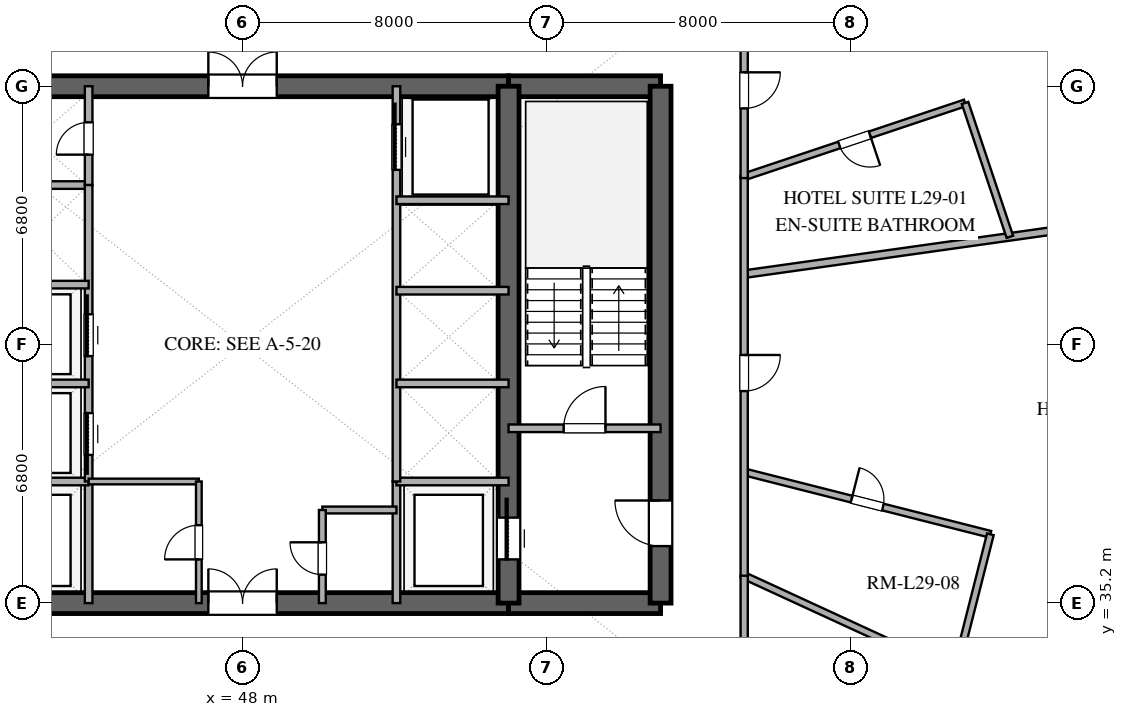
"""IFC4 building model, lengths in metres.
Left out: names, types, materials, properties, quantities, classifications, styles, units other than length and angle.
Written with IfcOpenShell. Run it as: python <this file> out.ifc"""

import sys

from ifc_helpers import new_model, si_unit, direction, frame, frame_2d, origin, place, context, subcontext, project, spatial, rectangle, extrude, element, fill, save


model = new_model("IFC4")
c1 = context("Model", 3, precision=1e-05, world=origin(), true_north=direction((0.0, 1.0)))
c2 = subcontext(c1, "Body", "Model", "MODEL_VIEW")
j1 = project(units=[si_unit("LENGTHUNIT", "METRE"), si_unit("PLANEANGLEUNIT", "RADIAN")], contexts=[c1])
p1 = place(None, origin())
s1 = spatial("IfcSite", under=j1, at=p1, CompositionType="ELEMENT")
p2 = place(p1, origin())
s2 = spatial("IfcBuilding", under=s1, at=p2, CompositionType="ELEMENT")
p3 = place(p2, frame((0.0, 0.0, 116.4)))
s3 = spatial("IfcBuildingStorey", under=s2, at=p3, CompositionType="ELEMENT", Elevation=116.4)
p4 = place(p3, frame((41.0, 35.2, 0.0), z_axis=(0.0, 0.0, 1.0), x_axis=(1.0, 0.0, 0.0)))
e1 = element("IfcWall", 1, at=p4, inside=s3, PredefinedType="SHEAR", context=c2, shape_type="SweptSolid", body=[
    extrude(rectangle(XDim=14.0, YDim=0.55, at=frame_2d((7.0, 0.0))), origin(), (0.0, 0.0, 1.0), 3.38),
])
p5 = place(p4, frame((6.1, 0.0, 0.0)))
e2 = element("IfcOpeningElement", 2, at=p5, cuts=e1, PredefinedType="OPENING", context=c2, shape_type="SweptSolid", body=[
    extrude(rectangle(XDim=1.8, YDim=2.25, at=frame_2d((0.9, 1.125))), frame((0.0, 0.285, 0.0), z_axis=(0.0, -1.0, 0.0), x_axis=(1.0, 0.0, 0.0)), (0.0, 0.0, 1.0), 0.57),
])
p6 = place(p3, frame((55.0, 35.2, 0.0), z_axis=(0.0, 0.0, 1.0), x_axis=(1.0, 0.0, 0.0)))
e3 = element("IfcWall", 3, at=p6, inside=s3, PredefinedType="SHEAR", context=c2, shape_type="SweptSolid", body=[
    extrude(rectangle(XDim=4.0, YDim=0.55, at=frame_2d((2.0, 0.0))), origin(), (0.0, 0.0, 1.0), 3.38),
])
p7 = place(p3, frame((41.0, 48.8, 0.0), z_axis=(0.0, 0.0, 1.0), x_axis=(1.0, 0.0, 0.0)))
e4 = element("IfcWall", 4, at=p7, inside=s3, PredefinedType="SHEAR", context=c2, shape_type="SweptSolid", body=[
    extrude(rectangle(XDim=14.0, YDim=0.55, at=frame_2d((7.0, 0.0))), origin(), (0.0, 0.0, 1.0), 3.38),
])
p8 = place(p7, frame((6.1, 0.0, 0.0)))
e5 = element("IfcOpeningElement", 5, at=p8, cuts=e4, PredefinedType="OPENING", context=c2, shape_type="SweptSolid", body=[
    extrude(rectangle(XDim=1.8, YDim=2.25, at=frame_2d((0.9, 1.125))), frame((0.0, 0.285, 0.0), z_axis=(0.0, -1.0, 0.0), x_axis=(1.0, 0.0, 0.0)), (0.0, 0.0, 1.0), 0.57),
])
p9 = place(p3, frame((55.0, 48.8, 0.0), z_axis=(0.0, 0.0, 1.0), x_axis=(1.0, 0.0, 0.0)))
e6 = element("IfcWall", 6, at=p9, inside=s3, PredefinedType="SHEAR", context=c2, shape_type="SweptSolid", body=[
    extrude(rectangle(XDim=4.0, YDim=0.55, at=frame_2d((2.0, 0.0))), origin(), (0.0, 0.0, 1.0), 3.38),
])
p10 = place(p3, frame((59.0, 35.2, 0.0), z_axis=(0.0, 0.0, 1.0), x_axis=(0.0, 1.0, 0.0)))
e7 = element("IfcWall", 7, at=p10, inside=s3, PredefinedType="SHEAR", context=c2, shape_type="SweptSolid", body=[
    extrude(rectangle(XDim=13.6, YDim=0.55, at=frame_2d((6.8, 0.0))), origin(), (0.0, 0.0, 1.0), 3.38),
])
p11 = place(p10, frame((1.5, 0.0, 0.0)))
e8 = element("IfcOpeningElement", 8, at=p11, cuts=e7, PredefinedType="OPENING", context=c2, shape_type="SweptSolid", body=[
    extrude(rectangle(XDim=1.2, YDim=2.15, at=frame_2d((0.6, 1.075))), frame((0.0, 0.285, 0.0), z_axis=(0.0, -1.0, 0.0), x_axis=(1.0, 0.0, 0.0)), (0.0, 0.0, 1.0), 0.57),
])
p12 = place(p3, frame((55.0, 35.2, 0.0), z_axis=(0.0, 0.0, 1.0), x_axis=(0.0, 1.0, 0.0)))
e9 = element("IfcWall", 9, at=p12, inside=s3, PredefinedType="SHEAR", context=c2, shape_type="SweptSolid", body=[
    extrude(rectangle(XDim=13.6, YDim=0.55, at=frame_2d((6.8, 0.0))), origin(), (0.0, 0.0, 1.0), 3.38),
])
p13 = place(p12, frame((1.15, 0.0, 0.0)))
e10 = element("IfcOpeningElement", 10, at=p13, cuts=e9, PredefinedType="OPENING", context=c2, shape_type="SweptSolid", body=[
    extrude(rectangle(XDim=1.1, YDim=2.2, at=frame_2d((0.55, 1.1))), frame((0.0, 0.285, 0.0), z_axis=(0.0, -1.0, 0.0), x_axis=(1.0, 0.0, 0.0)), (0.0, 0.0, 1.0), 0.57),
])
p14 = place(p3, frame((55.0, 39.8, 0.0), z_axis=(0.0, 0.0, 1.0), x_axis=(1.0, 0.0, 0.0)))
e11 = element("IfcWall", 11, at=p14, inside=s3, PredefinedType="SOLIDWALL", context=c2, shape_type="SweptSolid", body=[
    extrude(rectangle(XDim=4.0, YDim=0.2, at=frame_2d((2.0, 0.0))), origin(), (0.0, 0.0, 1.0), 2.74),
])
p15 = place(p14, frame((1.45, 0.0, 0.0)))
e12 = element("IfcOpeningElement", 12, at=p15, cuts=e11, PredefinedType="OPENING", context=c2, shape_type="SweptSolid", body=[
    extrude(rectangle(XDim=1.1, YDim=2.15, at=frame_2d((0.55, 1.075))), frame((0.0, 0.11, 0.0), z_axis=(0.0, -1.0, 0.0), x_axis=(1.0, 0.0, 0.0)), (0.0, 0.0, 1.0), 0.22),
])
p16 = place(p3, frame((43.95, 35.2, 0.0), z_axis=(0.0, 0.0, 1.0), x_axis=(0.0, 1.0, 0.0)))
e13 = element("IfcWall", 13, at=p16, inside=s3, PredefinedType="SOLIDWALL", context=c2, shape_type="SweptSolid", body=[
    extrude(rectangle(XDim=3.2, YDim=0.2, at=frame_2d((1.6, 0.0))), origin(), (0.0, 0.0, 1.0), 2.74),
])
p17 = place(p3, frame((41.0, 38.4, 0.0), z_axis=(0.0, 0.0, 1.0), x_axis=(1.0, 0.0, 0.0)))
e14 = element("IfcWall", 14, at=p17, inside=s3, PredefinedType="SOLIDWALL", context=c2, shape_type="SweptSolid", body=[
    extrude(rectangle(XDim=2.95, YDim=0.2, at=frame_2d((1.475, 0.0))), origin(), (0.0, 0.0, 1.0), 2.74),
])
p18 = place(p3, frame((52.05, 35.2, 0.0), z_axis=(0.0, 0.0, 1.0), x_axis=(0.0, 1.0, 0.0)))
e15 = element("IfcWall", 15, at=p18, inside=s3, PredefinedType="SOLIDWALL", context=c2, shape_type="SweptSolid", body=[
    extrude(rectangle(XDim=3.2, YDim=0.2, at=frame_2d((1.6, 0.0))), origin(), (0.0, 0.0, 1.0), 2.74),
])
for number, where, z_axis, x_axis in (
    (16, (52.05, 38.4, 0.0), (0.0, 0.0, 1.0), (1.0, 0.0, 0.0)),
    (17, (41.0, 46.2, 0.0), (0.0, 0.0, 1.0), (1.0, 0.0, 0.0)),
):
    element("IfcWall", number, at=place(p3, frame(where, z_axis=z_axis, x_axis=x_axis)), inside=s3, PredefinedType="SOLIDWALL", context=c2, shape_type="SweptSolid", body=[
        extrude(rectangle(XDim=2.95, YDim=0.2, at=frame_2d((1.475, 0.0))), origin(), (0.0, 0.0, 1.0), 2.74),
    ])
p19 = place(p3, frame((43.95, 46.2, 0.0), z_axis=(0.0, 0.0, 1.0), x_axis=(0.0, 1.0, 0.0)))
e18 = element("IfcWall", 18, at=p19, inside=s3, PredefinedType="SOLIDWALL", context=c2, shape_type="SweptSolid", body=[
    extrude(rectangle(XDim=2.6, YDim=0.2, at=frame_2d((1.3, 0.0))), origin(), (0.0, 0.0, 1.0), 2.74),
])
p20 = place(p19, frame((0.8, 0.0, 0.0)))
e19 = element("IfcOpeningElement", 19, at=p20, cuts=e18, PredefinedType="OPENING", context=c2, shape_type="SweptSolid", body=[
    extrude(rectangle(XDim=0.85, YDim=2.15, at=frame_2d((0.425, 1.075))), frame((0.0, 0.11, 0.0), z_axis=(0.0, -1.0, 0.0), x_axis=(1.0, 0.0, 0.0)), (0.0, 0.0, 1.0), 0.22),
])
p21 = place(p3, frame((43.95, 38.4, 0.0), z_axis=(0.0, 0.0, 1.0), x_axis=(0.0, 1.0, 0.0)))
e20 = element("IfcWall", 20, at=p21, inside=s3, PredefinedType="SOLIDWALL", context=c2, shape_type="SweptSolid", body=[
    extrude(rectangle(XDim=7.8, YDim=0.2, at=frame_2d((3.9, 0.0))), origin(), (0.0, 0.0, 1.0), 2.74),
])
p22 = place(p21, frame((0.7, 0.0, 0.0)))
e21 = element("IfcOpeningElement", 21, at=p22, cuts=e20, PredefinedType="OPENING", context=c2, shape_type="SweptSolid", body=[
    extrude(rectangle(XDim=1.1, YDim=2.2, at=frame_2d((0.55, 1.1))), frame((0.0, 0.11, 0.0), z_axis=(0.0, -1.0, 0.0), x_axis=(1.0, 0.0, 0.0)), (0.0, 0.0, 1.0), 0.22),
])
p23 = place(p21, frame((3.3, 0.0, 0.0)))
e22 = element("IfcOpeningElement", 22, at=p23, cuts=e20, PredefinedType="OPENING", context=c2, shape_type="SweptSolid", body=[
    extrude(rectangle(XDim=1.1, YDim=2.2, at=frame_2d((0.55, 1.1))), frame((0.0, 0.11, 0.0), z_axis=(0.0, -1.0, 0.0), x_axis=(1.0, 0.0, 0.0)), (0.0, 0.0, 1.0), 0.22),
])
for number, where, z_axis, x_axis in (
    (23, (41.0, 40.98, 0.0), (0.0, 0.0, 1.0), (1.0, 0.0, 0.0)),
    (24, (41.0, 43.58, 0.0), (0.0, 0.0, 1.0), (1.0, 0.0, 0.0)),
):
    element("IfcWall", number, at=place(p3, frame(where, z_axis=z_axis, x_axis=x_axis)), inside=s3, PredefinedType="SOLIDWALL", context=c2, shape_type="SweptSolid", body=[
        extrude(rectangle(XDim=2.95, YDim=0.2, at=frame_2d((1.475, 0.0))), origin(), (0.0, 0.0, 1.0), 2.74),
    ])
p24 = place(p3, frame((52.05, 38.4, 0.0), z_axis=(0.0, 0.0, 1.0), x_axis=(0.0, 1.0, 0.0)))
e25 = element("IfcWall", 25, at=p24, inside=s3, PredefinedType="SOLIDWALL", context=c2, shape_type="SweptSolid", body=[
    extrude(rectangle(XDim=10.4, YDim=0.2, at=frame_2d((5.2, 0.0))), origin(), (0.0, 0.0, 1.0), 2.74),
])
p25 = place(p24, frame((8.2, 0.0, 0.0)))
e26 = element("IfcOpeningElement", 26, at=p25, cuts=e25, PredefinedType="OPENING", context=c2, shape_type="SweptSolid", body=[
    extrude(rectangle(XDim=1.2, YDim=2.2, at=frame_2d((0.6, 1.1))), frame((0.0, 0.11, 0.0), z_axis=(0.0, -1.0, 0.0), x_axis=(1.0, 0.0, 0.0)), (0.0, 0.0, 1.0), 0.22),
])
for number, where, z_axis, x_axis in (
    (27, (52.05, 40.98, 0.0), (0.0, 0.0, 1.0), (1.0, 0.0, 0.0)),
    (28, (52.05, 43.42, 0.0), (0.0, 0.0, 1.0), (1.0, 0.0, 0.0)),
    (29, (52.05, 45.8, 0.0), (0.0, 0.0, 1.0), (1.0, 0.0, 0.0)),
):
    element("IfcWall", number, at=place(p3, frame(where, z_axis=z_axis, x_axis=x_axis)), inside=s3, PredefinedType="SOLIDWALL", context=c2, shape_type="SweptSolid", body=[
        extrude(rectangle(XDim=2.95, YDim=0.2, at=frame_2d((1.475, 0.0))), origin(), (0.0, 0.0, 1.0), 2.74),
    ])
p26 = place(p3, frame((43.95, 38.4, 0.0), z_axis=(0.0, 0.0, 1.0), x_axis=(1.0, 0.0, 0.0)))
e30 = element("IfcWall", 30, at=p26, inside=s3, PredefinedType="PARTITIONING", context=c2, shape_type="SweptSolid", body=[
    extrude(rectangle(XDim=2.9, YDim=0.15, at=frame_2d((1.45, 0.0))), origin(), (0.0, 0.0, 1.0), 2.74),
])
p27 = place(p3, frame((46.85, 35.2, 0.0), z_axis=(0.0, 0.0, 1.0), x_axis=(0.0, 1.0, 0.0)))
e31 = element("IfcWall", 31, at=p27, inside=s3, PredefinedType="PARTITIONING", context=c2, shape_type="SweptSolid", body=[
    extrude(rectangle(XDim=3.2, YDim=0.15, at=frame_2d((1.6, 0.0))), origin(), (0.0, 0.0, 1.0), 2.74),
])
p28 = place(p27, frame((1.15, 0.0, 0.0)))
e32 = element("IfcOpeningElement", 32, at=p28, cuts=e31, PredefinedType="OPENING", context=c2, shape_type="SweptSolid", body=[
    extrude(rectangle(XDim=0.9, YDim=2.15, at=frame_2d((0.45, 1.075))), frame((0.0, 0.085, 0.0), z_axis=(0.0, -1.0, 0.0), x_axis=(1.0, 0.0, 0.0)), (0.0, 0.0, 1.0), 0.17),
])
p29 = place(p3, frame((50.1, 37.65, 0.0), z_axis=(0.0, 0.0, 1.0), x_axis=(1.0, 0.0, 0.0)))
e33 = element("IfcWall", 33, at=p29, inside=s3, PredefinedType="PLUMBINGWALL", context=c2, shape_type="SweptSolid", body=[
    extrude(rectangle(XDim=1.95, YDim=0.18, at=frame_2d((0.975, 0.0))), origin(), (0.0, 0.0, 1.0), 2.74),
])
p30 = place(p3, frame((50.1, 35.2, 0.0), z_axis=(0.0, 0.0, 1.0), x_axis=(0.0, 1.0, 0.0)))
e34 = element("IfcWall", 34, at=p30, inside=s3, PredefinedType="PLUMBINGWALL", context=c2, shape_type="SweptSolid", body=[
    extrude(rectangle(XDim=2.45, YDim=0.18, at=frame_2d((1.225, 0.0))), origin(), (0.0, 0.0, 1.0), 2.74),
])
p31 = place(p30, frame((0.75, 0.0, 0.0)))
e35 = element("IfcOpeningElement", 35, at=p31, cuts=e34, PredefinedType="OPENING", context=c2, shape_type="SweptSolid", body=[
    extrude(rectangle(XDim=0.85, YDim=2.1, at=frame_2d((0.425, 1.05))), frame((0.0, 0.1, 0.0), z_axis=(0.0, -1.0, 0.0), x_axis=(1.0, 0.0, 0.0)), (0.0, 0.0, 1.0), 0.2),
])
p32 = place(p3, frame((61.2, 43.855, 0.0), z_axis=(0.0, 0.0, 1.0), x_axis=(0.990266848234, 0.139181785048, 0.0)))
e36 = element("IfcWall", 36, at=p32, inside=s3, PredefinedType="PARTITIONING", context=c2, shape_type="SweptSolid", body=[
    extrude(rectangle(XDim=15.005, YDim=0.2, at=frame_2d((7.502, 0.0))), origin(), (0.0, 0.0, 1.0), 2.74),
])
p33 = place(p3, frame((61.2, 38.653, 0.0), z_axis=(0.0, 0.0, 1.0), x_axis=(0.96932048276, -0.24580032893, 0.0)))
e37 = element("IfcWall", 37, at=p33, inside=s3, PredefinedType="PLUMBINGWALL", context=c2, shape_type="SweptSolid", body=[
    extrude(rectangle(XDim=6.684, YDim=0.18, at=frame_2d((3.342, 0.0))), origin(), (0.0, 0.0, 1.0), 2.74),
])
p34 = place(p33, frame((2.917, 0.0, 0.0)))
e38 = element("IfcOpeningElement", 38, at=p34, cuts=e37, PredefinedType="OPENING", context=c2, shape_type="SweptSolid", body=[
    extrude(rectangle(XDim=0.85, YDim=2.1, at=frame_2d((0.425, 1.05))), frame((0.0, 0.1, 0.0), z_axis=(0.0, -1.0, 0.0), x_axis=(1.0, 0.0, 0.0)), (0.0, 0.0, 1.0), 0.2),
])
p35 = place(p3, frame((67.012, 48.361, 0.0), z_axis=(0.0, 0.0, 1.0), x_axis=(-0.948332174456, -0.317279193915, 0.0)))
e39 = element("IfcWall", 39, at=p35, inside=s3, PredefinedType="PLUMBINGWALL", context=c2, shape_type="SweptSolid", body=[
    extrude(rectangle(XDim=6.129, YDim=0.18, at=frame_2d((3.064, 0.0))), origin(), (0.0, 0.0, 1.0), 2.74),
])
p36 = place(p35, frame((2.639, 0.0, 0.0)))
e40 = element("IfcOpeningElement", 40, at=p36, cuts=e39, PredefinedType="OPENING", context=c2, shape_type="SweptSolid", body=[
    extrude(rectangle(XDim=0.85, YDim=2.1, at=frame_2d((0.425, 1.05))), frame((0.0, 0.1, 0.0), z_axis=(0.0, -1.0, 0.0), x_axis=(1.0, 0.0, 0.0)), (0.0, 0.0, 1.0), 0.2),
])
p37 = place(p3, frame((66.754, 33.363, 0.0), z_axis=(0.0, 0.0, 1.0), x_axis=(-0.908301480607, 0.418316172681, 0.0)))
e41 = element("IfcWall", 41, at=p37, inside=s3, PredefinedType="PLUMBINGWALL", context=c2, shape_type="SweptSolid", body=[
    extrude(rectangle(XDim=6.115, YDim=0.18, at=frame_2d((3.057, 0.0))), origin(), (0.0, 0.0, 1.0), 2.74),
])
p38 = place(p3, frame((61.2, 46.45, 0.0), z_axis=(0.0, 0.0, 1.0), x_axis=(0.0, -1.0, 0.0)))
e42 = element("IfcWall", 42, at=p38, inside=s3, PredefinedType="PARTITIONING", context=c2, shape_type="SweptSolid", body=[
    extrude(rectangle(XDim=10.564, YDim=0.19, at=frame_2d((5.282, 0.0))), origin(), (0.0, 0.0, 1.0), 2.74),
])
p39 = place(p38, frame((4.722, 0.0, 0.0)))
e43 = element("IfcOpeningElement", 43, at=p39, cuts=e42, PredefinedType="OPENING", context=c2, shape_type="SweptSolid", body=[
    extrude(rectangle(XDim=0.95, YDim=2.15, at=frame_2d((0.475, 1.075))), frame((0.0, 0.105, 0.0), z_axis=(0.0, -1.0, 0.0), x_axis=(1.0, 0.0, 0.0)), (0.0, 0.0, 1.0), 0.21),
])
p40 = place(p3, frame((61.2, 51.0, 0.0), z_axis=(0.0, 0.0, 1.0), x_axis=(0.0, -1.0, 0.0)))
e44 = element("IfcWall", 44, at=p40, inside=s3, PredefinedType="PARTITIONING", context=c2, shape_type="SweptSolid", body=[
    extrude(rectangle(XDim=4.617, YDim=0.19, at=frame_2d((2.309, 0.0))), origin(), (0.0, 0.0, 1.0), 2.74),
])
p41 = place(p40, frame((1.833, 0.0, 0.0)))
e45 = element("IfcOpeningElement", 45, at=p41, cuts=e44, PredefinedType="OPENING", context=c2, shape_type="SweptSolid", body=[
    extrude(rectangle(XDim=0.95, YDim=2.15, at=frame_2d((0.475, 1.075))), frame((0.0, 0.105, 0.0), z_axis=(0.0, -1.0, 0.0), x_axis=(1.0, 0.0, 0.0)), (0.0, 0.0, 1.0), 0.21),
])
p42 = place(p3, frame((67.678, 37.01, 0.0), z_axis=(0.0, 0.0, 1.0), x_axis=(-0.245725202551, -0.969339530212, 0.0)))
e46 = element("IfcWall", 46, at=p42, inside=s3, PredefinedType="PLUMBINGWALL", context=c2, shape_type="SweptSolid", body=[
    extrude(rectangle(XDim=3.763, YDim=0.18, at=frame_2d((1.881, 0.0))), origin(), (0.0, 0.0, 1.0), 2.74),
])
p43 = place(p3, frame((68.191, 44.838, 0.0), z_axis=(0.0, 0.0, 1.0), x_axis=(-0.317291996527, 0.948327891048, 0.0)))
e47 = element("IfcWall", 47, at=p43, inside=s3, PredefinedType="PLUMBINGWALL", context=c2, shape_type="SweptSolid", body=[
    extrude(rectangle(XDim=3.716, YDim=0.18, at=frame_2d((1.858, 0.0))), origin(), (0.0, 0.0, 1.0), 2.74),
])
p44 = place(p3, frame((61.2, 33.0, 0.0), z_axis=(0.0, 0.0, 1.0), x_axis=(0.0, 1.0, 0.0)))
e48 = element("IfcWall", 48, at=p44, inside=s3, PredefinedType="PARTITIONING", context=c2, shape_type="SweptSolid", body=[
    extrude(rectangle(XDim=2.921, YDim=0.19, at=frame_2d((1.46, 0.0))), origin(), (0.0, 0.0, 1.0), 2.74),
])
p45 = place(p13, origin())
e49 = element("IfcDoor", 49, at=p45, inside=s3, OperationType="SLIDING_TO_RIGHT", PredefinedType="DOOR", context=c2, shape_type="SweptSolid", body=[
    extrude(rectangle(XDim=1.1, YDim=2.2, at=frame_2d((0.55, 1.1))), frame((0.0, 0.025, 0.0), z_axis=(0.0, -1.0, 0.0), x_axis=(1.0, 0.0, 0.0)), (0.0, 0.0, 1.0), 0.05),
])
fill(e10, e49)
p46 = place(p11, origin())
e50 = element("IfcDoor", 50, at=p46, inside=s3, OperationType="SINGLE_SWING_RIGHT", PredefinedType="DOOR", context=c2, shape_type="SweptSolid", body=[
    extrude(rectangle(XDim=1.2, YDim=2.15, at=frame_2d((0.6, 1.075))), frame((0.0, 0.025, 0.0), z_axis=(0.0, -1.0, 0.0), x_axis=(1.0, 0.0, 0.0)), (0.0, 0.0, 1.0), 0.05),
])
fill(e8, e50)
p47 = place(p5, origin())
e51 = element("IfcDoor", 51, at=p47, inside=s3, OperationType="DOUBLE_DOOR_SINGLE_SWING", PredefinedType="DOOR", context=c2, shape_type="SweptSolid", body=[
    extrude(rectangle(XDim=1.8, YDim=2.25, at=frame_2d((0.9, 1.125))), frame((0.0, 0.025, 0.0), z_axis=(0.0, -1.0, 0.0), x_axis=(1.0, 0.0, 0.0)), (0.0, 0.0, 1.0), 0.05),
])
fill(e2, e51)
p48 = place(p8, origin())
e52 = element("IfcDoor", 52, at=p48, inside=s3, OperationType="DOUBLE_DOOR_SINGLE_SWING", PredefinedType="DOOR", context=c2, shape_type="SweptSolid", body=[
    extrude(rectangle(XDim=1.8, YDim=2.25, at=frame_2d((0.9, 1.125))), frame((0.0, 0.025, 0.0), z_axis=(0.0, -1.0, 0.0), x_axis=(1.0, 0.0, 0.0)), (0.0, 0.0, 1.0), 0.05),
])
fill(e5, e52)
p49 = place(p15, origin())
e53 = element("IfcDoor", 53, at=p49, inside=s3, OperationType="SINGLE_SWING_RIGHT", PredefinedType="DOOR", context=c2, shape_type="SweptSolid", body=[
    extrude(rectangle(XDim=1.1, YDim=2.15, at=frame_2d((0.55, 1.075))), frame((0.0, 0.025, 0.0), z_axis=(0.0, -1.0, 0.0), x_axis=(1.0, 0.0, 0.0)), (0.0, 0.0, 1.0), 0.05),
])
fill(e12, e53)
p50 = place(p20, origin())
e54 = element("IfcDoor", 54, at=p50, inside=s3, OperationType="SINGLE_SWING_LEFT", PredefinedType="DOOR", context=c2, shape_type="SweptSolid", body=[
    extrude(rectangle(XDim=0.85, YDim=2.15, at=frame_2d((0.425, 1.075))), frame((0.0, 0.025, 0.0), z_axis=(0.0, -1.0, 0.0), x_axis=(1.0, 0.0, 0.0)), (0.0, 0.0, 1.0), 0.05),
])
fill(e19, e54)
p51 = place(p22, origin())
e55 = element("IfcDoor", 55, at=p51, inside=s3, OperationType="SLIDING_TO_LEFT", PredefinedType="DOOR", context=c2, shape_type="SweptSolid", body=[
    extrude(rectangle(XDim=1.1, YDim=2.2, at=frame_2d((0.55, 1.1))), frame((0.0, 0.025, 0.0), z_axis=(0.0, -1.0, 0.0), x_axis=(1.0, 0.0, 0.0)), (0.0, 0.0, 1.0), 0.05),
])
fill(e21, e55)
p52 = place(p23, origin())
e56 = element("IfcDoor", 56, at=p52, inside=s3, OperationType="SLIDING_TO_RIGHT", PredefinedType="DOOR", context=c2, shape_type="SweptSolid", body=[
    extrude(rectangle(XDim=1.1, YDim=2.2, at=frame_2d((0.55, 1.1))), frame((0.0, 0.025, 0.0), z_axis=(0.0, -1.0, 0.0), x_axis=(1.0, 0.0, 0.0)), (0.0, 0.0, 1.0), 0.05),
])
fill(e22, e56)
p53 = place(p25, origin())
e57 = element("IfcDoor", 57, at=p53, inside=s3, OperationType="SLIDING_TO_RIGHT", PredefinedType="DOOR", context=c2, shape_type="SweptSolid", body=[
    extrude(rectangle(XDim=1.2, YDim=2.2, at=frame_2d((0.6, 1.1))), frame((0.0, 0.025, 0.0), z_axis=(0.0, -1.0, 0.0), x_axis=(1.0, 0.0, 0.0)), (0.0, 0.0, 1.0), 0.05),
])
fill(e26, e57)
p54 = place(p28, origin())
e58 = element("IfcDoor", 58, at=p54, inside=s3, OperationType="SINGLE_SWING_LEFT", PredefinedType="DOOR", context=c2, shape_type="SweptSolid", body=[
    extrude(rectangle(XDim=0.9, YDim=2.15, at=frame_2d((0.45, 1.075))), frame((0.0, 0.025, 0.0), z_axis=(0.0, -1.0, 0.0), x_axis=(1.0, 0.0, 0.0)), (0.0, 0.0, 1.0), 0.05),
])
fill(e32, e58)
p55 = place(p31, origin())
e59 = element("IfcDoor", 59, at=p55, inside=s3, OperationType="SINGLE_SWING_RIGHT", PredefinedType="DOOR", context=c2, shape_type="SweptSolid", body=[
    extrude(rectangle(XDim=0.85, YDim=2.1, at=frame_2d((0.425, 1.05))), frame((0.0, 0.025, 0.0), z_axis=(0.0, -1.0, 0.0), x_axis=(1.0, 0.0, 0.0)), (0.0, 0.0, 1.0), 0.05),
])
fill(e35, e59)
p56 = place(p34, origin())
e60 = element("IfcDoor", 60, at=p56, inside=s3, OperationType="SINGLE_SWING_LEFT", PredefinedType="DOOR", context=c2, shape_type="SweptSolid", body=[
    extrude(rectangle(XDim=0.85, YDim=2.1, at=frame_2d((0.425, 1.05))), frame((0.0, 0.025, 0.0), z_axis=(0.0, -1.0, 0.0), x_axis=(1.0, 0.0, 0.0)), (0.0, 0.0, 1.0), 0.05),
])
fill(e38, e60)
p57 = place(p36, origin())
e61 = element("IfcDoor", 61, at=p57, inside=s3, OperationType="SINGLE_SWING_LEFT", PredefinedType="DOOR", context=c2, shape_type="SweptSolid", body=[
    extrude(rectangle(XDim=0.85, YDim=2.1, at=frame_2d((0.425, 1.05))), frame((0.0, 0.025, 0.0), z_axis=(0.0, -1.0, 0.0), x_axis=(1.0, 0.0, 0.0)), (0.0, 0.0, 1.0), 0.05),
])
fill(e40, e61)
p58 = place(p39, origin())
e62 = element("IfcDoor", 62, at=p58, inside=s3, OperationType="SINGLE_SWING_LEFT", PredefinedType="DOOR", context=c2, shape_type="SweptSolid", body=[
    extrude(rectangle(XDim=0.95, YDim=2.15, at=frame_2d((0.475, 1.075))), frame((0.0, 0.025, 0.0), z_axis=(0.0, -1.0, 0.0), x_axis=(1.0, 0.0, 0.0)), (0.0, 0.0, 1.0), 0.05),
])
fill(e43, e62)
p59 = place(p41, origin())
e63 = element("IfcDoor", 63, at=p59, inside=s3, OperationType="SINGLE_SWING_LEFT", PredefinedType="DOOR", context=c2, shape_type="SweptSolid", body=[
    extrude(rectangle(XDim=0.95, YDim=2.15, at=frame_2d((0.475, 1.075))), frame((0.0, 0.025, 0.0), z_axis=(0.0, -1.0, 0.0), x_axis=(1.0, 0.0, 0.0)), (0.0, 0.0, 1.0), 0.05),
])
fill(e45, e63)
save(model, sys.argv[1])
